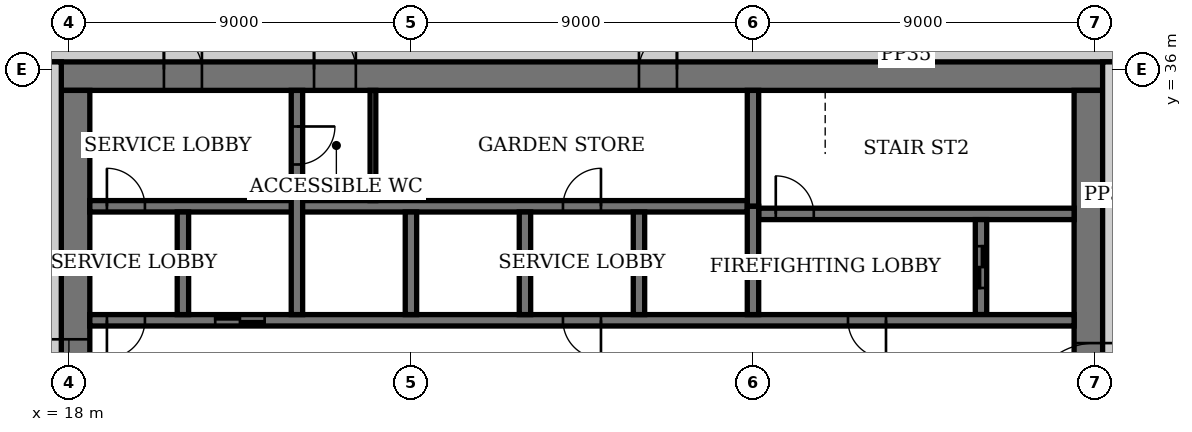
"""IFC4 building model, lengths in metres.
Left out: names, types, materials, properties, quantities, classifications, styles, units other than length and angle.
Written with IfcOpenShell. Run it as: python <this file> out.ifc"""

import sys

from ifc_helpers import new_model, si_unit, direction, frame, frame_2d, origin, place, context, subcontext, project, spatial, polyline, rectangle, outline, extrude, element, fill, save


model = new_model("IFC4")
c1 = context("Model", 3, precision=1e-05, world=origin(), true_north=direction((0.0, 1.0)))
c2 = subcontext(c1, "Body", "Model", "MODEL_VIEW")
j1 = project(units=[si_unit("LENGTHUNIT", "METRE"), si_unit("PLANEANGLEUNIT", "RADIAN")], contexts=[c1])
p1 = place(None, origin())
s1 = spatial("IfcSite", under=j1, at=p1, CompositionType="ELEMENT")
p2 = place(p1, origin())
s2 = spatial("IfcBuilding", under=s1, at=p2, CompositionType="ELEMENT")
p3 = place(p2, frame((0.0, 0.0, 311.8)))
s3 = spatial("IfcBuildingStorey", under=s2, at=p3, CompositionType="ELEMENT", Elevation=311.8)
p4 = place(p3, frame((45.55, 36.0, 0.0), z_axis=(0.0, 0.0, 1.0), x_axis=(-1.0, 0.0, 0.0)))
e1 = element("IfcWall", 1, at=p4, inside=s3, PredefinedType="SHEAR", context=c2, shape_type="SweptSolid", body=[
    extrude(rectangle(XDim=28.1, YDim=1.1, at=frame_2d((14.05, 0.0))), origin(), (0.0, 0.0, 1.0), 6.0),
])
p5 = place(p4, frame((11.55, 0.0, 0.0)))
e2 = element("IfcOpeningElement", 2, at=p5, cuts=e1, PredefinedType="OPENING", context=c2, shape_type="SweptSolid", body=[
    extrude(rectangle(XDim=1.0, YDim=2.4, at=frame_2d((0.5, 1.2))), frame((0.0, 0.56, 0.0), z_axis=(0.0, -1.0, 0.0), x_axis=(1.0, 0.0, 0.0)), (0.0, 0.0, 1.0), 1.12),
])
p6 = place(p4, frame((20.0, 0.0, 0.0)))
e3 = element("IfcOpeningElement", 3, at=p6, cuts=e1, PredefinedType="OPENING", context=c2, shape_type="SweptSolid", body=[
    extrude(rectangle(XDim=1.1, YDim=2.4, at=frame_2d((0.55, 1.2))), frame((0.0, 0.56, 0.0), z_axis=(0.0, -1.0, 0.0), x_axis=(1.0, 0.0, 0.0)), (0.0, 0.0, 1.0), 1.12),
])
p7 = place(p4, frame((24.05, 0.0, 0.0)))
e4 = element("IfcOpeningElement", 4, at=p7, cuts=e1, PredefinedType="OPENING", context=c2, shape_type="SweptSolid", body=[
    extrude(rectangle(XDim=1.0, YDim=2.4, at=frame_2d((0.5, 1.2))), frame((0.0, 0.56, 0.0), z_axis=(0.0, -1.0, 0.0), x_axis=(1.0, 0.0, 0.0)), (0.0, 0.0, 1.0), 1.12),
])
p8 = place(p3, frame((18.0, 35.45, 0.0), z_axis=(0.0, 0.0, 1.0), x_axis=(0.0, -1.0, 0.0)))
e5 = element("IfcWall", 5, at=p8, inside=s3, PredefinedType="SHEAR", context=c2, shape_type="SweptSolid", body=[
    extrude(rectangle(XDim=16.9, YDim=1.1, at=frame_2d((8.45, 0.0))), origin(), (0.0, 0.0, 1.0), 6.0),
])
p9 = place(p8, frame((8.45, 0.0, 0.0)))
e6 = element("IfcOpeningElement", 6, at=p9, cuts=e5, PredefinedType="OPENING", context=c2, shape_type="SweptSolid", body=[
    extrude(rectangle(XDim=1.8, YDim=2.4, at=frame_2d((0.9, 1.2))), frame((0.0, 0.56, 0.0), z_axis=(0.0, -1.0, 0.0), x_axis=(1.0, 0.0, 0.0)), (0.0, 0.0, 1.0), 1.12),
])
p10 = place(p8, frame((6.55, 0.0, 0.9)))
e7 = element("IfcOpeningElement", 7, at=p10, cuts=e5, PredefinedType="OPENING", context=c2, shape_type="SweptSolid", body=[
    extrude(rectangle(XDim=1.5, YDim=1.8, at=frame_2d((0.75, 0.9))), frame((0.0, 0.56, 0.0), z_axis=(0.0, -1.0, 0.0), x_axis=(1.0, 0.0, 0.0)), (0.0, 0.0, 1.0), 1.12),
])
p11 = place(p3, frame((45.0, 18.55, 0.0), z_axis=(0.0, 0.0, 1.0), x_axis=(0.0, 1.0, 0.0)))
e8 = element("IfcWall", 8, at=p11, inside=s3, PredefinedType="SHEAR", context=c2, shape_type="SweptSolid", body=[
    extrude(rectangle(XDim=16.9, YDim=1.1, at=frame_2d((8.45, 0.0))), origin(), (0.0, 0.0, 1.0), 6.0),
])
p12 = place(p11, frame((8.45, 0.0, 0.0)))
e9 = element("IfcOpeningElement", 9, at=p12, cuts=e8, PredefinedType="OPENING", context=c2, shape_type="SweptSolid", body=[
    extrude(rectangle(XDim=1.8, YDim=2.4, at=frame_2d((0.9, 1.2))), frame((0.0, 0.56, 0.0), z_axis=(0.0, -1.0, 0.0), x_axis=(1.0, 0.0, 0.0)), (0.0, 0.0, 1.0), 1.12),
])
p13 = place(p11, frame((6.65, 0.0, 0.9)))
e10 = element("IfcOpeningElement", 10, at=p13, cuts=e8, PredefinedType="OPENING", context=c2, shape_type="SweptSolid", body=[
    extrude(rectangle(XDim=1.5, YDim=1.8, at=frame_2d((0.75, 0.9))), frame((0.0, 0.56, 0.0), z_axis=(0.0, -1.0, 0.0), x_axis=(1.0, 0.0, 0.0)), (0.0, 0.0, 1.0), 1.12),
])
p14 = place(p3, frame((36.15, 32.2, 0.0), z_axis=(0.0, 0.0, 1.0), x_axis=(1.0, 0.0, 0.0)))
e11 = element("IfcWall", 11, at=p14, inside=s3, PredefinedType="SHEAR", context=c2, shape_type="SweptSolid", body=[
    extrude(rectangle(XDim=8.3, YDim=0.3, at=frame_2d((4.15, 0.0))), origin(), (0.0, 0.0, 1.0), 6.0),
])
p15 = place(p14, frame((0.45, 0.0, 0.0)))
e12 = element("IfcOpeningElement", 12, at=p15, cuts=e11, PredefinedType="OPENING", context=c2, shape_type="SweptSolid", body=[
    extrude(rectangle(XDim=1.0, YDim=2.4, at=frame_2d((0.5, 1.2))), frame((0.0, 0.16, 0.0), z_axis=(0.0, -1.0, 0.0), x_axis=(1.0, 0.0, 0.0)), (0.0, 0.0, 1.0), 0.32),
])
p16 = place(p3, frame((36.0, 32.4, 0.0), z_axis=(0.0, 0.0, 1.0), x_axis=(0.0, 1.0, 0.0)))
e13 = element("IfcWall", 13, at=p16, inside=s3, PredefinedType="SHEAR", context=c2, shape_type="SweptSolid", body=[
    extrude(rectangle(XDim=3.05, YDim=0.3, at=frame_2d((1.525, 0.0))), origin(), (0.0, 0.0, 1.0), 6.0),
])
p17 = place(p3, frame((42.0, 29.55, 0.0), z_axis=(0.0, 0.0, 1.0), x_axis=(0.0, 1.0, 0.0)))
e14 = element("IfcWall", 14, at=p17, inside=s3, PredefinedType="SHEAR", context=c2, shape_type="SweptSolid", body=[
    extrude(rectangle(XDim=2.5, YDim=0.3, at=frame_2d((1.25, 0.0))), origin(), (0.0, 0.0, 1.0), 6.0),
])
p18 = place(p17, frame((0.7, 0.0, 0.0)))
e15 = element("IfcOpeningElement", 15, at=p18, cuts=e14, PredefinedType="OPENING", context=c2, shape_type="SweptSolid", body=[
    extrude(rectangle(XDim=1.1, YDim=2.4, at=frame_2d((0.55, 1.2))), frame((0.0, 0.16, 0.0), z_axis=(0.0, -1.0, 0.0), x_axis=(1.0, 0.0, 0.0)), (0.0, 0.0, 1.0), 0.32),
])
p19 = place(p3, frame((18.55, 29.4, 0.0), z_axis=(0.0, 0.0, 1.0), x_axis=(1.0, 0.0, 0.0)))
e16 = element("IfcWall", 16, at=p19, inside=s3, PredefinedType="SHEAR", context=c2, shape_type="SweptSolid", body=[
    extrude(rectangle(XDim=25.9, YDim=0.3, at=frame_2d((12.95, 0.0))), origin(), (0.0, 0.0, 1.0), 6.0),
])
p20 = place(p19, frame((19.95, 0.0, 0.0)))
e17 = element("IfcOpeningElement", 17, at=p20, cuts=e16, PredefinedType="OPENING", context=c2, shape_type="SweptSolid", body=[
    extrude(rectangle(XDim=1.0, YDim=2.4, at=frame_2d((0.5, 1.2))), frame((0.0, 0.16, 0.0), z_axis=(0.0, -1.0, 0.0), x_axis=(1.0, 0.0, 0.0)), (0.0, 0.0, 1.0), 0.32),
])
p21 = place(p19, frame((0.45, 0.0, 0.0)))
e18 = element("IfcOpeningElement", 18, at=p21, cuts=e16, PredefinedType="OPENING", context=c2, shape_type="SweptSolid", body=[
    extrude(rectangle(XDim=1.0, YDim=2.4, at=frame_2d((0.5, 1.2))), frame((0.0, 0.16, 0.0), z_axis=(0.0, -1.0, 0.0), x_axis=(1.0, 0.0, 0.0)), (0.0, 0.0, 1.0), 0.32),
])
p22 = place(p19, frame((12.45, 0.0, 0.0)))
e19 = element("IfcOpeningElement", 19, at=p22, cuts=e16, PredefinedType="OPENING", context=c2, shape_type="SweptSolid", body=[
    extrude(rectangle(XDim=1.0, YDim=2.4, at=frame_2d((0.5, 1.2))), frame((0.0, 0.16, 0.0), z_axis=(0.0, -1.0, 0.0), x_axis=(1.0, 0.0, 0.0)), (0.0, 0.0, 1.0), 0.32),
])
p23 = place(p19, frame((3.3, 0.0, 0.0)))
e20 = element("IfcOpeningElement", 20, at=p23, cuts=e16, PredefinedType="OPENING", context=c2, shape_type="SweptSolid", body=[
    extrude(rectangle(XDim=1.3, YDim=2.4, at=frame_2d((0.65, 1.2))), frame((0.0, 0.16, 0.0), z_axis=(0.0, -1.0, 0.0), x_axis=(1.0, 0.0, 0.0)), (0.0, 0.0, 1.0), 0.32),
])
p24 = place(p3, frame((18.55, 32.4, 0.0), z_axis=(0.0, 0.0, 1.0), x_axis=(1.0, 0.0, 0.0)))
e21 = element("IfcWall", 21, at=p24, inside=s3, PredefinedType="SHEAR", context=c2, shape_type="SweptSolid", body=[
    extrude(rectangle(XDim=17.3, YDim=0.3, at=frame_2d((8.65, 0.0))), origin(), (0.0, 0.0, 1.0), 6.0),
])
p25 = place(p24, frame((0.45, 0.0, 0.0)))
e22 = element("IfcOpeningElement", 22, at=p25, cuts=e21, PredefinedType="OPENING", context=c2, shape_type="SweptSolid", body=[
    extrude(rectangle(XDim=1.0, YDim=2.4, at=frame_2d((0.5, 1.2))), frame((0.0, 0.16, 0.0), z_axis=(0.0, -1.0, 0.0), x_axis=(1.0, 0.0, 0.0)), (0.0, 0.0, 1.0), 0.32),
])
p26 = place(p24, frame((12.45, 0.0, 0.0)))
e23 = element("IfcOpeningElement", 23, at=p26, cuts=e21, PredefinedType="OPENING", context=c2, shape_type="SweptSolid", body=[
    extrude(rectangle(XDim=1.0, YDim=2.4, at=frame_2d((0.5, 1.2))), frame((0.0, 0.16, 0.0), z_axis=(0.0, -1.0, 0.0), x_axis=(1.0, 0.0, 0.0)), (0.0, 0.0, 1.0), 0.32),
])
for number, where, z_axis, x_axis in (
    (24, (33.0, 29.55, 0.0), (0.0, 0.0, 1.0), (0.0, 1.0, 0.0)),
    (25, (30.0, 29.55, 0.0), (0.0, 0.0, 1.0), (0.0, 1.0, 0.0)),
    (26, (27.0, 29.55, 0.0), (0.0, 0.0, 1.0), (0.0, 1.0, 0.0)),
):
    element("IfcWall", number, at=place(p3, frame(where, z_axis=z_axis, x_axis=x_axis)), inside=s3, PredefinedType="SHEAR", context=c2, shape_type="SweptSolid", body=[
        extrude(rectangle(XDim=2.7, YDim=0.3, at=frame_2d((1.35, 0.0))), origin(), (0.0, 0.0, 1.0), 6.0),
    ])
p27 = place(p3, frame((24.0, 29.55, 0.0), z_axis=(0.0, 0.0, 1.0), x_axis=(0.0, 1.0, 0.0)))
e27 = element("IfcWall", 27, at=p27, inside=s3, PredefinedType="SHEAR", context=c2, shape_type="SweptSolid", body=[
    extrude(rectangle(XDim=5.9, YDim=0.3, at=frame_2d((2.95, 0.0))), origin(), (0.0, 0.0, 1.0), 6.0),
])
p28 = place(p27, frame((3.95, 0.0, 0.0)))
e28 = element("IfcOpeningElement", 28, at=p28, cuts=e27, PredefinedType="OPENING", context=c2, shape_type="SweptSolid", body=[
    extrude(rectangle(XDim=1.0, YDim=2.4, at=frame_2d((0.5, 1.2))), frame((0.0, 0.16, 0.0), z_axis=(0.0, -1.0, 0.0), x_axis=(1.0, 0.0, 0.0)), (0.0, 0.0, 1.0), 0.32),
])
p29 = place(p3, frame((21.0, 29.55, 0.0), z_axis=(0.0, 0.0, 1.0), x_axis=(0.0, 1.0, 0.0)))
e29 = element("IfcWall", 29, at=p29, inside=s3, PredefinedType="SHEAR", context=c2, shape_type="SweptSolid", body=[
    extrude(rectangle(XDim=2.7, YDim=0.3, at=frame_2d((1.35, 0.0))), origin(), (0.0, 0.0, 1.0), 6.0),
])
p30 = place(p3, frame((36.0, 29.55, 0.0), z_axis=(0.0, 0.0, 1.0), x_axis=(0.0, 1.0, 0.0)))
e30 = element("IfcWall", 30, at=p30, inside=s3, PredefinedType="SHEAR", context=c2, shape_type="SweptSolid", body=[
    extrude(rectangle(XDim=2.85, YDim=0.3, at=frame_2d((1.425, 0.0))), origin(), (0.0, 0.0, 1.0), 6.0),
])
p31 = place(p3, frame((26.0, 32.55, 0.0), z_axis=(0.0, 0.0, 1.0), x_axis=(0.0, 1.0, 0.0)))
e31 = element("IfcWall", 31, at=p31, inside=s3, PredefinedType="PARTITIONING", context=c2, shape_type="SweptSolid", body=[
    extrude(rectangle(XDim=2.9, YDim=0.15, at=frame_2d((1.45, 0.0))), origin(), (0.0, 0.0, 1.0), 5.7),
])
p32 = place(p3, frame((0.0, 0.0, 5.6)))
e32 = element("IfcWall", 32, at=p32, inside=s3, PredefinedType="PARAPET", context=c2, shape_type="SweptSolid", body=[
    extrude(outline(polyline([(45.0, 0.0), (46.175, 0.077), (47.329, 0.307), (48.444, 0.685), (49.5, 1.206), (50.479, 1.86), (51.364, 2.636), (52.14, 3.521), (52.794, 4.5), (53.315, 5.556), (53.693, 6.671), (53.923, 7.825), (54.0, 9.0), (54.0, 36.0), (53.923, 37.175), (53.693, 38.329), (53.315, 39.444), (52.794, 40.5), (52.14, 41.479), (51.364, 42.364), (50.479, 43.14), (49.5, 43.794), (48.444, 44.315), (47.329, 44.693), (46.175, 44.923), (45.0, 45.0), (18.0, 45.0), (16.825, 44.923), (15.671, 44.693), (14.556, 44.315), (13.5, 43.794), (12.521, 43.14), (11.636, 42.364), (10.86, 41.479), (10.206, 40.5), (9.685, 39.444), (9.307, 38.329), (9.077, 37.175), (9.0, 36.0), (9.0, 9.0), (9.077, 7.825), (9.307, 6.671), (9.685, 5.556), (10.206, 4.5), (10.86, 3.521), (11.636, 2.636), (12.521, 1.86), (13.5, 1.206), (14.556, 0.685), (15.671, 0.307), (16.825, 0.077), (18.0, 0.0), (45.0, 0.0)]), holes=[polyline([(44.989, 0.35), (18.011, 0.35), (16.871, 0.425), (15.761, 0.646), (14.69, 1.009), (13.675, 1.51), (12.735, 2.138), (11.884, 2.884), (11.138, 3.735), (10.51, 4.675), (10.009, 5.69), (9.646, 6.761), (9.425, 7.871), (9.35, 9.011), (9.35, 35.989), (9.425, 37.129), (9.646, 38.239), (10.009, 39.31), (10.51, 40.325), (11.138, 41.265), (11.884, 42.116), (12.735, 42.862), (13.675, 43.49), (14.69, 43.991), (15.761, 44.354), (16.871, 44.575), (18.011, 44.65), (44.989, 44.65), (46.129, 44.575), (47.239, 44.354), (48.31, 43.991), (49.325, 43.49), (50.265, 42.862), (51.116, 42.116), (51.862, 41.265), (52.49, 40.325), (52.991, 39.31), (53.354, 38.239), (53.575, 37.129), (53.65, 35.989), (53.65, 9.011), (53.575, 7.871), (53.354, 6.761), (52.991, 5.69), (52.49, 4.675), (51.862, 3.735), (51.116, 2.884), (50.265, 2.138), (49.325, 1.51), (48.31, 1.009), (47.239, 0.646), (46.129, 0.425), (44.989, 0.35)])]), origin(), (0.0, 0.0, 1.0), 0.6),
])
p33 = place(p12, origin())
e33 = element("IfcDoor", 33, at=p33, inside=s3, OperationType="DOUBLE_DOOR_DOUBLE_SWING", PredefinedType="DOOR", context=c2, shape_type="SweptSolid", body=[
    extrude(rectangle(XDim=1.8, YDim=2.4, at=frame_2d((0.9, 1.2))), frame((0.0, 0.03, 0.0), z_axis=(0.0, -1.0, 0.0), x_axis=(1.0, 0.0, 0.0)), (0.0, 0.0, 1.0), 0.06),
    extrude(rectangle(XDim=0.04, YDim=2.4, at=frame_2d((0.02, 1.2))), frame((0.0, 0.55, 0.0), z_axis=(0.0, -1.0, 0.0), x_axis=(1.0, 0.0, 0.0)), (0.0, 0.0, 1.0), 1.1),
    extrude(rectangle(XDim=0.04, YDim=2.4, at=frame_2d((1.78, 1.2))), frame((0.0, 0.55, 0.0), z_axis=(0.0, -1.0, 0.0), x_axis=(1.0, 0.0, 0.0)), (0.0, 0.0, 1.0), 1.1),
    extrude(rectangle(XDim=1.8, YDim=0.04, at=frame_2d((0.9, 2.38))), frame((0.0, 0.55, 0.0), z_axis=(0.0, -1.0, 0.0), x_axis=(1.0, 0.0, 0.0)), (0.0, 0.0, 1.0), 1.1),
])
fill(e9, e33)
p34 = place(p5, origin())
e34 = element("IfcDoor", 34, at=p34, inside=s3, OperationType="SINGLE_SWING_LEFT", PredefinedType="DOOR", context=c2, shape_type="SweptSolid", body=[
    extrude(rectangle(XDim=1.0, YDim=2.4, at=frame_2d((0.5, 1.2))), frame((0.0, 0.025, 0.0), z_axis=(0.0, -1.0, 0.0), x_axis=(1.0, 0.0, 0.0)), (0.0, 0.0, 1.0), 0.05),
    extrude(rectangle(XDim=0.04, YDim=2.4, at=frame_2d((0.02, 1.2))), frame((0.0, 0.4, 0.0), z_axis=(0.0, -1.0, 0.0), x_axis=(1.0, 0.0, 0.0)), (0.0, 0.0, 1.0), 0.8),
    extrude(rectangle(XDim=0.04, YDim=2.4, at=frame_2d((0.98, 1.2))), frame((0.0, 0.4, 0.0), z_axis=(0.0, -1.0, 0.0), x_axis=(1.0, 0.0, 0.0)), (0.0, 0.0, 1.0), 0.8),
    extrude(rectangle(XDim=1.0, YDim=0.04, at=frame_2d((0.5, 2.38))), frame((0.0, 0.4, 0.0), z_axis=(0.0, -1.0, 0.0), x_axis=(1.0, 0.0, 0.0)), (0.0, 0.0, 1.0), 0.8),
])
fill(e2, e34)
p35 = place(p6, origin())
e35 = element("IfcDoor", 35, at=p35, inside=s3, OperationType="SINGLE_SWING_RIGHT", PredefinedType="DOOR", context=c2, shape_type="SweptSolid", body=[
    extrude(rectangle(XDim=1.1, YDim=2.4, at=frame_2d((0.55, 1.2))), frame((0.0, 0.025, 0.0), z_axis=(0.0, -1.0, 0.0), x_axis=(1.0, 0.0, 0.0)), (0.0, 0.0, 1.0), 0.05),
    extrude(rectangle(XDim=0.04, YDim=2.4, at=frame_2d((0.02, 1.2))), frame((0.0, 0.44, 0.0), z_axis=(0.0, -1.0, 0.0), x_axis=(1.0, 0.0, 0.0)), (0.0, 0.0, 1.0), 0.88),
    extrude(rectangle(XDim=0.04, YDim=2.4, at=frame_2d((1.08, 1.2))), frame((0.0, 0.44, 0.0), z_axis=(0.0, -1.0, 0.0), x_axis=(1.0, 0.0, 0.0)), (0.0, 0.0, 1.0), 0.88),
    extrude(rectangle(XDim=1.1, YDim=0.04, at=frame_2d((0.55, 2.38))), frame((0.0, 0.44, 0.0), z_axis=(0.0, -1.0, 0.0), x_axis=(1.0, 0.0, 0.0)), (0.0, 0.0, 1.0), 0.88),
])
fill(e3, e35)
p36 = place(p7, origin())
e36 = element("IfcDoor", 36, at=p36, inside=s3, OperationType="SINGLE_SWING_RIGHT", PredefinedType="DOOR", context=c2, shape_type="SweptSolid", body=[
    extrude(rectangle(XDim=1.0, YDim=2.4, at=frame_2d((0.5, 1.2))), frame((0.0, 0.025, 0.0), z_axis=(0.0, -1.0, 0.0), x_axis=(1.0, 0.0, 0.0)), (0.0, 0.0, 1.0), 0.05),
    extrude(rectangle(XDim=0.04, YDim=2.4, at=frame_2d((0.02, 1.2))), frame((0.0, 0.4, 0.0), z_axis=(0.0, -1.0, 0.0), x_axis=(1.0, 0.0, 0.0)), (0.0, 0.0, 1.0), 0.8),
    extrude(rectangle(XDim=0.04, YDim=2.4, at=frame_2d((0.98, 1.2))), frame((0.0, 0.4, 0.0), z_axis=(0.0, -1.0, 0.0), x_axis=(1.0, 0.0, 0.0)), (0.0, 0.0, 1.0), 0.8),
    extrude(rectangle(XDim=1.0, YDim=0.04, at=frame_2d((0.5, 2.38))), frame((0.0, 0.4, 0.0), z_axis=(0.0, -1.0, 0.0), x_axis=(1.0, 0.0, 0.0)), (0.0, 0.0, 1.0), 0.8),
])
fill(e4, e36)
p37 = place(p15, origin())
e37 = element("IfcDoor", 37, at=p37, inside=s3, OperationType="SINGLE_SWING_RIGHT", PredefinedType="DOOR", context=c2, shape_type="SweptSolid", body=[
    extrude(rectangle(XDim=1.0, YDim=2.4, at=frame_2d((0.5, 1.2))), frame((0.0, 0.03, 0.0), z_axis=(0.0, -1.0, 0.0), x_axis=(1.0, 0.0, 0.0)), (0.0, 0.0, 1.0), 0.06),
])
fill(e12, e37)
p38 = place(p20, origin())
e38 = element("IfcDoor", 38, at=p38, inside=s3, OperationType="SINGLE_SWING_RIGHT", PredefinedType="DOOR", context=c2, shape_type="SweptSolid", body=[
    extrude(rectangle(XDim=1.0, YDim=2.4, at=frame_2d((0.5, 1.2))), frame((0.0, 0.03, 0.0), z_axis=(0.0, -1.0, 0.0), x_axis=(1.0, 0.0, 0.0)), (0.0, 0.0, 1.0), 0.06),
])
fill(e17, e38)
p39 = place(p21, origin())
e39 = element("IfcDoor", 39, at=p39, inside=s3, OperationType="SINGLE_SWING_LEFT", PredefinedType="DOOR", context=c2, shape_type="SweptSolid", body=[
    extrude(rectangle(XDim=1.0, YDim=2.4, at=frame_2d((0.5, 1.2))), frame((0.0, 0.03, 0.0), z_axis=(0.0, -1.0, 0.0), x_axis=(1.0, 0.0, 0.0)), (0.0, 0.0, 1.0), 0.06),
])
fill(e18, e39)
p40 = place(p25, origin())
e40 = element("IfcDoor", 40, at=p40, inside=s3, OperationType="SINGLE_SWING_RIGHT", PredefinedType="DOOR", context=c2, shape_type="SweptSolid", body=[
    extrude(rectangle(XDim=1.0, YDim=2.4, at=frame_2d((0.5, 1.2))), frame((0.0, 0.03, 0.0), z_axis=(0.0, -1.0, 0.0), x_axis=(1.0, 0.0, 0.0)), (0.0, 0.0, 1.0), 0.06),
])
fill(e22, e40)
p41 = place(p28, origin())
e41 = element("IfcDoor", 41, at=p41, inside=s3, OperationType="SINGLE_SWING_RIGHT", PredefinedType="DOOR", context=c2, shape_type="SweptSolid", body=[
    extrude(rectangle(XDim=1.0, YDim=2.4, at=frame_2d((0.5, 1.2))), frame((0.0, 0.03, 0.0), z_axis=(0.0, -1.0, 0.0), x_axis=(1.0, 0.0, 0.0)), (0.0, 0.0, 1.0), 0.06),
])
fill(e28, e41)
p42 = place(p22, origin())
e42 = element("IfcDoor", 42, at=p42, inside=s3, OperationType="SINGLE_SWING_RIGHT", PredefinedType="DOOR", context=c2, shape_type="SweptSolid", body=[
    extrude(rectangle(XDim=1.0, YDim=2.4, at=frame_2d((0.5, 1.2))), frame((0.0, 0.03, 0.0), z_axis=(0.0, -1.0, 0.0), x_axis=(1.0, 0.0, 0.0)), (0.0, 0.0, 1.0), 0.06),
])
fill(e19, e42)
p43 = place(p26, origin())
e43 = element("IfcDoor", 43, at=p43, inside=s3, OperationType="SINGLE_SWING_LEFT", PredefinedType="DOOR", context=c2, shape_type="SweptSolid", body=[
    extrude(rectangle(XDim=1.0, YDim=2.4, at=frame_2d((0.5, 1.2))), frame((0.0, 0.03, 0.0), z_axis=(0.0, -1.0, 0.0), x_axis=(1.0, 0.0, 0.0)), (0.0, 0.0, 1.0), 0.06),
])
fill(e23, e43)
p44 = place(p23, origin())
e44 = element("IfcDoor", 44, at=p44, inside=s3, OperationType="DOUBLE_DOOR_SLIDING", PredefinedType="DOOR", context=c2, shape_type="SweptSolid", body=[
    extrude(rectangle(XDim=1.3, YDim=2.4, at=frame_2d((0.65, 1.2))), frame((0.0, 0.02, 0.0), z_axis=(0.0, -1.0, 0.0), x_axis=(1.0, 0.0, 0.0)), (0.0, 0.0, 1.0), 0.04),
])
fill(e20, e44)
p45 = place(p18, origin())
e45 = element("IfcDoor", 45, at=p45, inside=s3, OperationType="DOUBLE_DOOR_SLIDING", PredefinedType="DOOR", context=c2, shape_type="SweptSolid", body=[
    extrude(rectangle(XDim=1.1, YDim=2.4, at=frame_2d((0.55, 1.2))), frame((0.0, 0.03, 0.0), z_axis=(0.0, -1.0, 0.0), x_axis=(1.0, 0.0, 0.0)), (0.0, 0.0, 1.0), 0.06),
])
fill(e15, e45)
p46 = place(p10, origin())
e46 = element("IfcWindow", 46, at=p46, inside=s3, PartitioningType="SINGLE_PANEL", PredefinedType="WINDOW", context=c2, shape_type="SweptSolid", body=[
    extrude(rectangle(XDim=1.5, YDim=1.8, at=frame_2d((0.75, 0.9))), frame((0.0, 0.03, 0.0), z_axis=(0.0, -1.0, 0.0), x_axis=(1.0, 0.0, 0.0)), (0.0, 0.0, 1.0), 0.06),
])
fill(e7, e46)
save(model, sys.argv[1])
